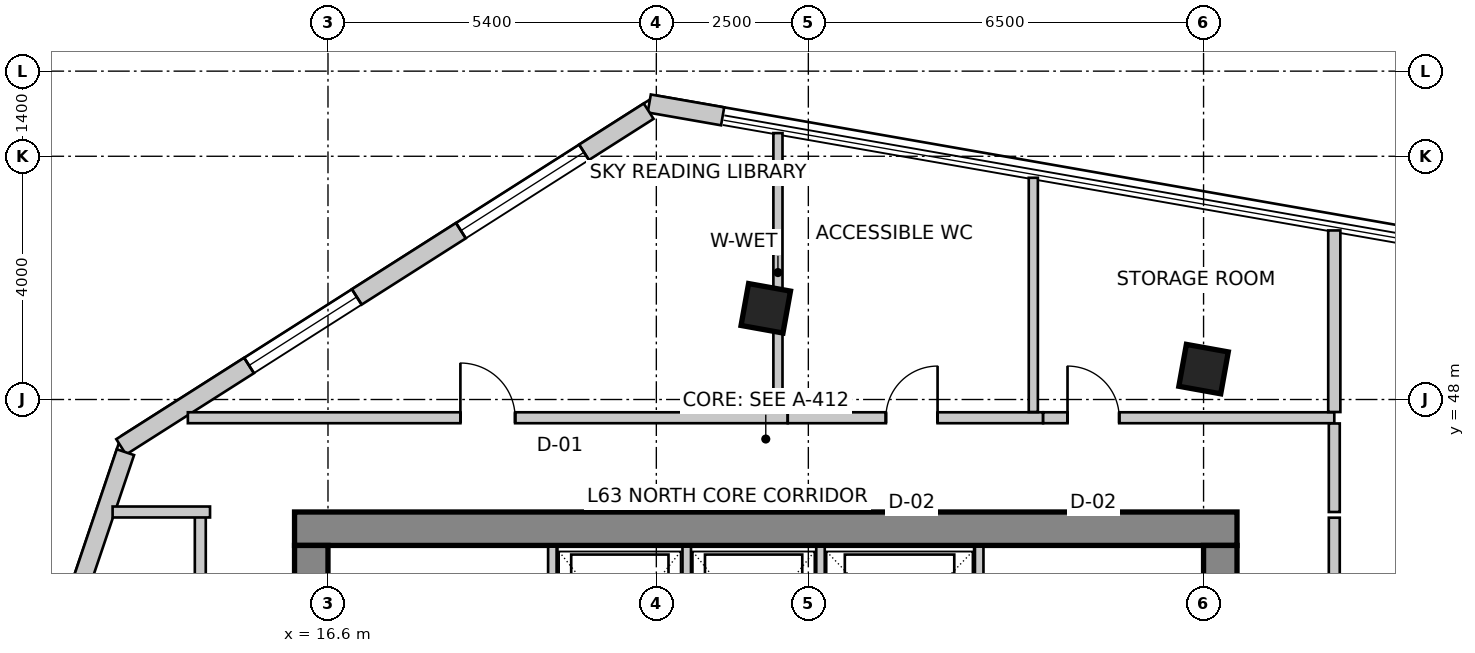
"""IFC4 building model, lengths in metres.
Left out: names, types, materials, properties, quantities, classifications, styles, units other than length and angle.
Written with IfcOpenShell. Run it as: python <this file> out.ifc"""

import sys

from ifc_helpers import new_model, si_unit, direction, frame, frame_2d, origin, origin_2d, place, context, subcontext, project, spatial, rectangle, extrude, source, transform, mapped, element, fill, save


model = new_model("IFC4")
c1 = context("Model", 3, precision=1e-05, world=origin(), true_north=direction((0.0, 1.0)))
c2 = subcontext(c1, "Body", "Model", "MODEL_VIEW")
j1 = project(units=[si_unit("LENGTHUNIT", "METRE"), si_unit("PLANEANGLEUNIT", "RADIAN")], contexts=[c1])
p1 = place(None, origin())
s1 = spatial("IfcSite", under=j1, at=p1, CompositionType="ELEMENT")
p2 = place(p1, origin())
s2 = spatial("IfcBuilding", under=s1, at=p2, CompositionType="ELEMENT")
p3 = place(p2, frame((0.0, 0.0, 249.3)))
s3 = spatial("IfcBuildingStorey", under=s2, at=p3, CompositionType="ELEMENT", Elevation=249.3)
p4 = place(p3, frame((16.05, 45.875, 0.0), z_axis=(0.0, 0.0, 1.0), x_axis=(1.0, 0.0, 0.0)))
e1 = element("IfcWall", 1, at=p4, inside=s3, PredefinedType="SHEAR", context=c2, shape_type="SweptSolid", body=[
    extrude(rectangle(XDim=15.5, YDim=0.55, at=frame_2d((7.75, 0.0))), origin(), (0.0, 0.0, 1.0), 3.6),
])
p5 = place(p3, frame((16.325, 34.2, 0.0), z_axis=(0.0, 0.0, 1.0), x_axis=(0.0, 1.0, 0.0)))
e2 = element("IfcWall", 2, at=p5, inside=s3, PredefinedType="SHEAR", context=c2, shape_type="SweptSolid", body=[
    extrude(rectangle(XDim=11.4, YDim=0.55, at=frame_2d((5.7, 0.0))), origin(), (0.0, 0.0, 1.0), 3.6),
])
m1 = source(origin(), c2, "Body", "SweptSolid", [
    extrude(rectangle(XDim=1.1, YDim=2.15, at=frame_2d((0.55, 1.075))), frame((0.0, 0.285, 0.0), z_axis=(0.0, -1.0, 0.0), x_axis=(1.0, 0.0, 0.0)), (0.0, 0.0, 1.0), 0.57),
])
p6 = place(p5, frame((7.15, 0.0, 0.0)))
e3 = element("IfcOpeningElement", 3, at=p6, cuts=e2, PredefinedType="OPENING", context=c2, shape_type="MappedRepresentation", body=[
    mapped(m1, transform((0.0, 0.0, 0.0), scale=1.0)),
])
p7 = place(p3, frame((31.275, 34.2, 0.0), z_axis=(0.0, 0.0, 1.0), x_axis=(0.0, 1.0, 0.0)))
e4 = element("IfcWall", 4, at=p7, inside=s3, PredefinedType="SHEAR", context=c2, shape_type="SweptSolid", body=[
    extrude(rectangle(XDim=11.4, YDim=0.55, at=frame_2d((5.7, 0.0))), origin(), (0.0, 0.0, 1.0), 3.6),
])
p8 = place(p7, frame((7.35, 0.0, 0.0)))
e5 = element("IfcOpeningElement", 5, at=p8, cuts=e4, PredefinedType="OPENING", context=c2, shape_type="MappedRepresentation", body=[
    mapped(m1, transform((0.0, 0.0, 0.0), scale=1.0)),
])
m2 = source(origin(), c2, "Body", "SweptSolid", [
    extrude(rectangle(XDim=0.7, YDim=0.7, at=origin_2d()), origin(), (0.0, 0.0, 1.0), 3.6),
])
for number, where, z_axis, x_axis in (
    (6, (23.8, 49.5, 0.0), (0.0, 0.0, 1.0), (0.984, -0.177, 0.0)),
    (7, (31.0, 48.5, 0.0), (0.0, 0.0, 1.0), (0.984, -0.177, 0.0)),
):
    element("IfcColumn", number, at=place(p3, frame(where, z_axis=z_axis, x_axis=x_axis)), inside=s3, PredefinedType="COLUMN", context=c2, shape_type="MappedRepresentation", body=[
        mapped(m2, transform((0.0, 0.0, 0.0), scale=1.0)),
    ])
p9 = place(p3, frame((23.09, 52.657, 0.0), z_axis=(0.0, 0.0, 1.0), x_axis=(-0.985025390124, 0.172409340845, 0.0)))
e8 = element("IfcWall", 8, at=p9, inside=s3, PredefinedType="SOLIDWALL", context=c2, shape_type="SweptSolid", body=[
    extrude(rectangle(XDim=1.225, YDim=0.3, at=frame_2d((0.612, 0.0))), origin(), (0.0, 0.0, 1.0), 3.35),
])
p10 = place(p3, frame((21.874, 52.742, 0.0), z_axis=(0.0, 0.0, 1.0), x_axis=(-0.84365659959, -0.536883173482, 0.0)))
e9 = element("IfcWall", 9, at=p10, inside=s3, PredefinedType="SOLIDWALL", context=c2, shape_type="SweptSolid", body=[
    extrude(rectangle(XDim=10.283, YDim=0.3, at=frame_2d((5.142, 0.0))), origin(), (0.0, 0.0, 1.0), 3.35),
])
m3 = source(origin(), c2, "Body", "SweptSolid", [
    extrude(rectangle(XDim=2.4, YDim=2.2, at=frame_2d((1.2, 1.1))), frame((0.0, 0.16, 0.0), z_axis=(0.0, -1.0, 0.0), x_axis=(1.0, 0.0, 0.0)), (0.0, 0.0, 1.0), 0.32),
])
p11 = place(p10, frame((1.26, 0.0, 0.85)))
e10 = element("IfcOpeningElement", 10, at=p11, cuts=e9, PredefinedType="OPENING", context=c2, shape_type="MappedRepresentation", body=[
    mapped(m3, transform((0.0, 0.0, 0.0), scale=1.0)),
])
m4 = source(origin(), c2, "Body", "SweptSolid", [
    extrude(rectangle(XDim=2.1, YDim=2.0, at=frame_2d((1.05, 1.0))), frame((0.0, 0.16, 0.0), z_axis=(0.0, -1.0, 0.0), x_axis=(1.0, 0.0, 0.0)), (0.0, 0.0, 1.0), 0.32),
])
p12 = place(p10, frame((5.69, 0.0, 0.85)))
e11 = element("IfcOpeningElement", 11, at=p12, cuts=e9, PredefinedType="OPENING", context=c2, shape_type="MappedRepresentation", body=[
    mapped(m4, transform((0.0, 0.0, 0.0), scale=1.0)),
])
p13 = place(p3, frame((13.269, 47.134, 0.0), z_axis=(0.0, 0.0, 1.0), x_axis=(-0.3199211297, -0.947444178182, 0.0)))
e12 = element("IfcWall", 12, at=p13, inside=s3, PredefinedType="SOLIDWALL", context=c2, shape_type="SweptSolid", body=[
    extrude(rectangle(XDim=16.132, YDim=0.3, at=frame_2d((8.066, 0.0))), origin(), (0.0, 0.0, 1.0), 3.35),
])
p14 = place(p13, frame((2.585, 0.0, 0.85)))
e13 = element("IfcOpeningElement", 13, at=p14, cuts=e12, PredefinedType="OPENING", context=c2, shape_type="MappedRepresentation", body=[
    mapped(m4, transform((0.0, 0.0, 0.0), scale=1.0)),
])
p15 = place(p13, frame((7.267, 0.0, 0.85)))
e14 = element("IfcOpeningElement", 14, at=p15, cuts=e12, PredefinedType="OPENING", context=c2, shape_type="MappedRepresentation", body=[
    mapped(m3, transform((0.0, 0.0, 0.0), scale=1.0)),
])
p16 = place(p13, frame((12.249, 0.0, 0.85)))
e15 = element("IfcOpeningElement", 15, at=p16, cuts=e12, PredefinedType="OPENING", context=c2, shape_type="MappedRepresentation", body=[
    mapped(m4, transform((0.0, 0.0, 0.0), scale=1.0)),
])
for number, where, z_axis, x_axis in (
    (16, (20.29, 43.28, 0.0), (0.0, 0.0, 1.0), (0.0, 1.0, 0.0)),
    (17, (27.31, 43.28, 0.0), (0.0, 0.0, 1.0), (0.0, 1.0, 0.0)),
):
    element("IfcWall", number, at=place(p3, frame(where, z_axis=z_axis, x_axis=x_axis)), inside=s3, PredefinedType="SOLIDWALL", context=c2, shape_type="SweptSolid", body=[
        extrude(rectangle(XDim=2.3, YDim=0.14, at=frame_2d((1.15, 0.0))), origin(), (0.0, 0.0, 1.0), 3.35),
    ])
for number, where, z_axis, x_axis in (
    (18, (22.5, 43.02, 0.0), (0.0, 0.0, 1.0), (0.0, 1.0, 0.0)),
    (19, (24.7, 43.02, 0.0), (0.0, 0.0, 1.0), (0.0, 1.0, 0.0)),
):
    element("IfcWall", number, at=place(p3, frame(where, z_axis=z_axis, x_axis=x_axis)), inside=s3, PredefinedType="SOLIDWALL", context=c2, shape_type="SweptSolid", body=[
        extrude(rectangle(XDim=2.56, YDim=0.14, at=frame_2d((1.28, 0.0))), origin(), (0.0, 0.0, 1.0), 3.35),
    ])
p17 = place(p3, frame((14.5, 33.744, 0.0), z_axis=(0.0, 0.0, 1.0), x_axis=(0.0, 1.0, 0.0)))
e20 = element("IfcWall", 20, at=p17, inside=s3, PredefinedType="PARTITIONING", context=c2, shape_type="SweptSolid", body=[
    extrude(rectangle(XDim=12.406, YDim=0.18, at=frame_2d((6.203, 0.0))), origin(), (0.0, 0.0, 1.0), 3.35),
])
m5 = source(origin(), c2, "Body", "SweptSolid", [
    extrude(rectangle(XDim=0.9, YDim=2.15, at=frame_2d((0.45, 1.075))), frame((0.0, 0.1, 0.0), z_axis=(0.0, -1.0, 0.0), x_axis=(1.0, 0.0, 0.0)), (0.0, 0.0, 1.0), 0.2),
])
p18 = place(p17, frame((4.37, 0.0, 0.0)))
e21 = element("IfcOpeningElement", 21, at=p18, cuts=e20, PredefinedType="OPENING", context=c2, shape_type="MappedRepresentation", body=[
    mapped(m5, transform((0.0, 0.0, 0.0), scale=1.0)),
])
p19 = place(p3, frame((14.66, 46.15, 0.0), z_axis=(0.0, 0.0, 1.0), x_axis=(-1.0, 0.0, 0.0)))
e22 = element("IfcWall", 22, at=p19, inside=s3, PredefinedType="PARTITIONING", context=c2, shape_type="SweptSolid", body=[
    extrude(rectangle(XDim=1.602, YDim=0.18, at=frame_2d((0.801, 0.0))), origin(), (0.0, 0.0, 1.0), 3.35),
])
p20 = place(p3, frame((14.295, 47.7, 0.0), z_axis=(0.0, 0.0, 1.0), x_axis=(1.0, 0.0, 0.0)))
e23 = element("IfcWall", 23, at=p20, inside=s3, PredefinedType="PARTITIONING", context=c2, shape_type="SweptSolid", body=[
    extrude(rectangle(XDim=9.865, YDim=0.18, at=frame_2d((4.932, 0.0))), origin(), (0.0, 0.0, 1.0), 2.935),
])
p21 = place(p20, frame((4.482, 0.0, 0.0)))
e24 = element("IfcOpeningElement", 24, at=p21, cuts=e23, PredefinedType="OPENING", context=c2, shape_type="MappedRepresentation", body=[
    mapped(m5, transform((0.0, 0.0, 0.0), scale=1.0)),
])
p22 = place(p3, frame((24.162, 47.7, 0.0), z_axis=(0.0, 0.0, 1.0), x_axis=(1.0, 0.0, 0.0)))
e25 = element("IfcWall", 25, at=p22, inside=s3, PredefinedType="PARTITIONING", context=c2, shape_type="SweptSolid", body=[
    extrude(rectangle(XDim=4.198, YDim=0.18, at=frame_2d((2.099, 0.0))), origin(), (0.0, 0.0, 1.0), 3.35),
])
m6 = source(origin(), c2, "Body", "SweptSolid", [
    extrude(rectangle(XDim=0.85, YDim=2.15, at=frame_2d((0.425, 1.075))), frame((0.0, 0.1, 0.0), z_axis=(0.0, -1.0, 0.0), x_axis=(1.0, 0.0, 0.0)), (0.0, 0.0, 1.0), 0.2),
])
p23 = place(p22, frame((1.613, 0.0, 0.0)))
e26 = element("IfcOpeningElement", 26, at=p23, cuts=e25, PredefinedType="OPENING", context=c2, shape_type="MappedRepresentation", body=[
    mapped(m6, transform((0.0, 0.0, 0.0), scale=1.0)),
])
p24 = place(p3, frame((28.362, 47.7, 0.0), z_axis=(0.0, 0.0, 1.0), x_axis=(1.0, 0.0, 0.0)))
e27 = element("IfcWall", 27, at=p24, inside=s3, PredefinedType="PARTITIONING", context=c2, shape_type="SweptSolid", body=[
    extrude(rectangle(XDim=4.788, YDim=0.18, at=frame_2d((2.394, 0.0))), origin(), (0.0, 0.0, 1.0), 2.788),
])
p25 = place(p24, frame((0.401, 0.0, 0.0)))
e28 = element("IfcOpeningElement", 28, at=p25, cuts=e27, PredefinedType="OPENING", context=c2, shape_type="MappedRepresentation", body=[
    mapped(m6, transform((0.0, 0.0, 0.0), scale=1.0)),
])
p26 = place(p3, frame((33.15, 47.606, 0.0), z_axis=(0.0, 0.0, 1.0), x_axis=(0.0, -1.0, 0.0)))
e29 = element("IfcWall", 29, at=p26, inside=s3, PredefinedType="PARTITIONING", context=c2, shape_type="SweptSolid", body=[
    extrude(rectangle(XDim=1.456, YDim=0.18, at=frame_2d((0.728, 0.0))), origin(), (0.0, 0.0, 1.0), 3.35),
])
p27 = place(p3, frame((33.15, 46.056, 0.0), z_axis=(0.0, 0.0, 1.0), x_axis=(0.0, -1.0, 0.0)))
e30 = element("IfcWall", 30, at=p27, inside=s3, PredefinedType="PARTITIONING", context=c2, shape_type="SweptSolid", body=[
    extrude(rectangle(XDim=4.636, YDim=0.18, at=frame_2d((2.318, 0.0))), origin(), (0.0, 0.0, 1.0), 2.788),
])
p28 = place(p27, frame((1.868, 0.0, 0.0)))
e31 = element("IfcOpeningElement", 31, at=p28, cuts=e30, PredefinedType="OPENING", context=c2, shape_type="MappedRepresentation", body=[
    mapped(m5, transform((0.0, 0.0, 0.0), scale=1.0)),
])
p29 = place(p3, frame((24.0, 52.381, 0.0), z_axis=(0.0, 0.0, 1.0), x_axis=(0.0, -1.0, 0.0)))
e32 = element("IfcWall", 32, at=p29, inside=s3, PredefinedType="PARTITIONING", context=c2, shape_type="SweptSolid", body=[
    extrude(rectangle(XDim=4.587, YDim=0.15, at=frame_2d((2.293, 0.0))), origin(), (0.0, 0.0, 1.0), 2.642),
])
p30 = place(p3, frame((28.2, 51.646, 0.0), z_axis=(0.0, 0.0, 1.0), x_axis=(0.0, -1.0, 0.0)))
e33 = element("IfcWall", 33, at=p30, inside=s3, PredefinedType="PARTITIONING", context=c2, shape_type="SweptSolid", body=[
    extrude(rectangle(XDim=3.852, YDim=0.15, at=frame_2d((1.926, 0.0))), origin(), (0.0, 0.0, 1.0), 2.642),
])
p31 = place(p3, frame((33.15, 50.78, 0.0), z_axis=(0.0, 0.0, 1.0), x_axis=(0.0, -1.0, 0.0)))
e34 = element("IfcWall", 34, at=p31, inside=s3, PredefinedType="PARTITIONING", context=c2, shape_type="SweptSolid", body=[
    extrude(rectangle(XDim=2.986, YDim=0.2, at=frame_2d((1.493, 0.0))), origin(), (0.0, 0.0, 1.0), 2.642),
])
m7 = source(origin(), c2, "Body", "SweptSolid", [
    extrude(rectangle(XDim=2.4, YDim=2.2, at=frame_2d((1.2, 1.1))), frame((0.0, -0.015, 0.0), z_axis=(0.0, -1.0, 0.0), x_axis=(1.0, 0.0, 0.0)), (0.0, 0.0, 1.0), 0.06),
])
p32 = place(p11, origin())
e35 = element("IfcWindow", 35, at=p32, inside=s3, PartitioningType="SINGLE_PANEL", PredefinedType="WINDOW", context=c2, shape_type="MappedRepresentation", body=[
    mapped(m7, transform((0.0, 0.0, 0.0), scale=1.0)),
])
fill(e10, e35)
m8 = source(origin(), c2, "Body", "SweptSolid", [
    extrude(rectangle(XDim=2.1, YDim=2.0, at=frame_2d((1.05, 1.0))), frame((0.0, -0.015, 0.0), z_axis=(0.0, -1.0, 0.0), x_axis=(1.0, 0.0, 0.0)), (0.0, 0.0, 1.0), 0.06),
])
p33 = place(p12, origin())
e36 = element("IfcWindow", 36, at=p33, inside=s3, PartitioningType="SINGLE_PANEL", PredefinedType="WINDOW", context=c2, shape_type="MappedRepresentation", body=[
    mapped(m8, transform((0.0, 0.0, 0.0), scale=1.0)),
])
fill(e11, e36)
m9 = source(origin(), c2, "Body", "SweptSolid", [
    extrude(rectangle(XDim=0.9, YDim=2.15, at=frame_2d((0.45, 1.075))), frame((0.0, 0.025, 0.0), z_axis=(0.0, -1.0, 0.0), x_axis=(1.0, 0.0, 0.0)), (0.0, 0.0, 1.0), 0.05),
])
p34 = place(p21, origin())
e37 = element("IfcDoor", 37, at=p34, inside=s3, OperationType="SINGLE_SWING_LEFT", PredefinedType="DOOR", context=c2, shape_type="MappedRepresentation", body=[
    mapped(m9, transform((0.0, 0.0, 0.0), scale=1.0)),
])
fill(e24, e37)
m10 = source(origin(), c2, "Body", "SweptSolid", [
    extrude(rectangle(XDim=0.85, YDim=2.15, at=frame_2d((0.425, 1.075))), frame((0.0, 0.025, 0.0), z_axis=(0.0, -1.0, 0.0), x_axis=(1.0, 0.0, 0.0)), (0.0, 0.0, 1.0), 0.05),
])
p35 = place(p23, origin())
e38 = element("IfcDoor", 38, at=p35, inside=s3, OperationType="SINGLE_SWING_RIGHT", PredefinedType="DOOR", context=c2, shape_type="MappedRepresentation", body=[
    mapped(m10, transform((0.0, 0.0, 0.0), scale=1.0)),
])
fill(e26, e38)
p36 = place(p25, origin())
e39 = element("IfcDoor", 39, at=p36, inside=s3, OperationType="SINGLE_SWING_LEFT", PredefinedType="DOOR", context=c2, shape_type="MappedRepresentation", body=[
    mapped(m10, transform((0.0, 0.0, 0.0), scale=1.0)),
])
fill(e28, e39)
save(model, sys.argv[1])
